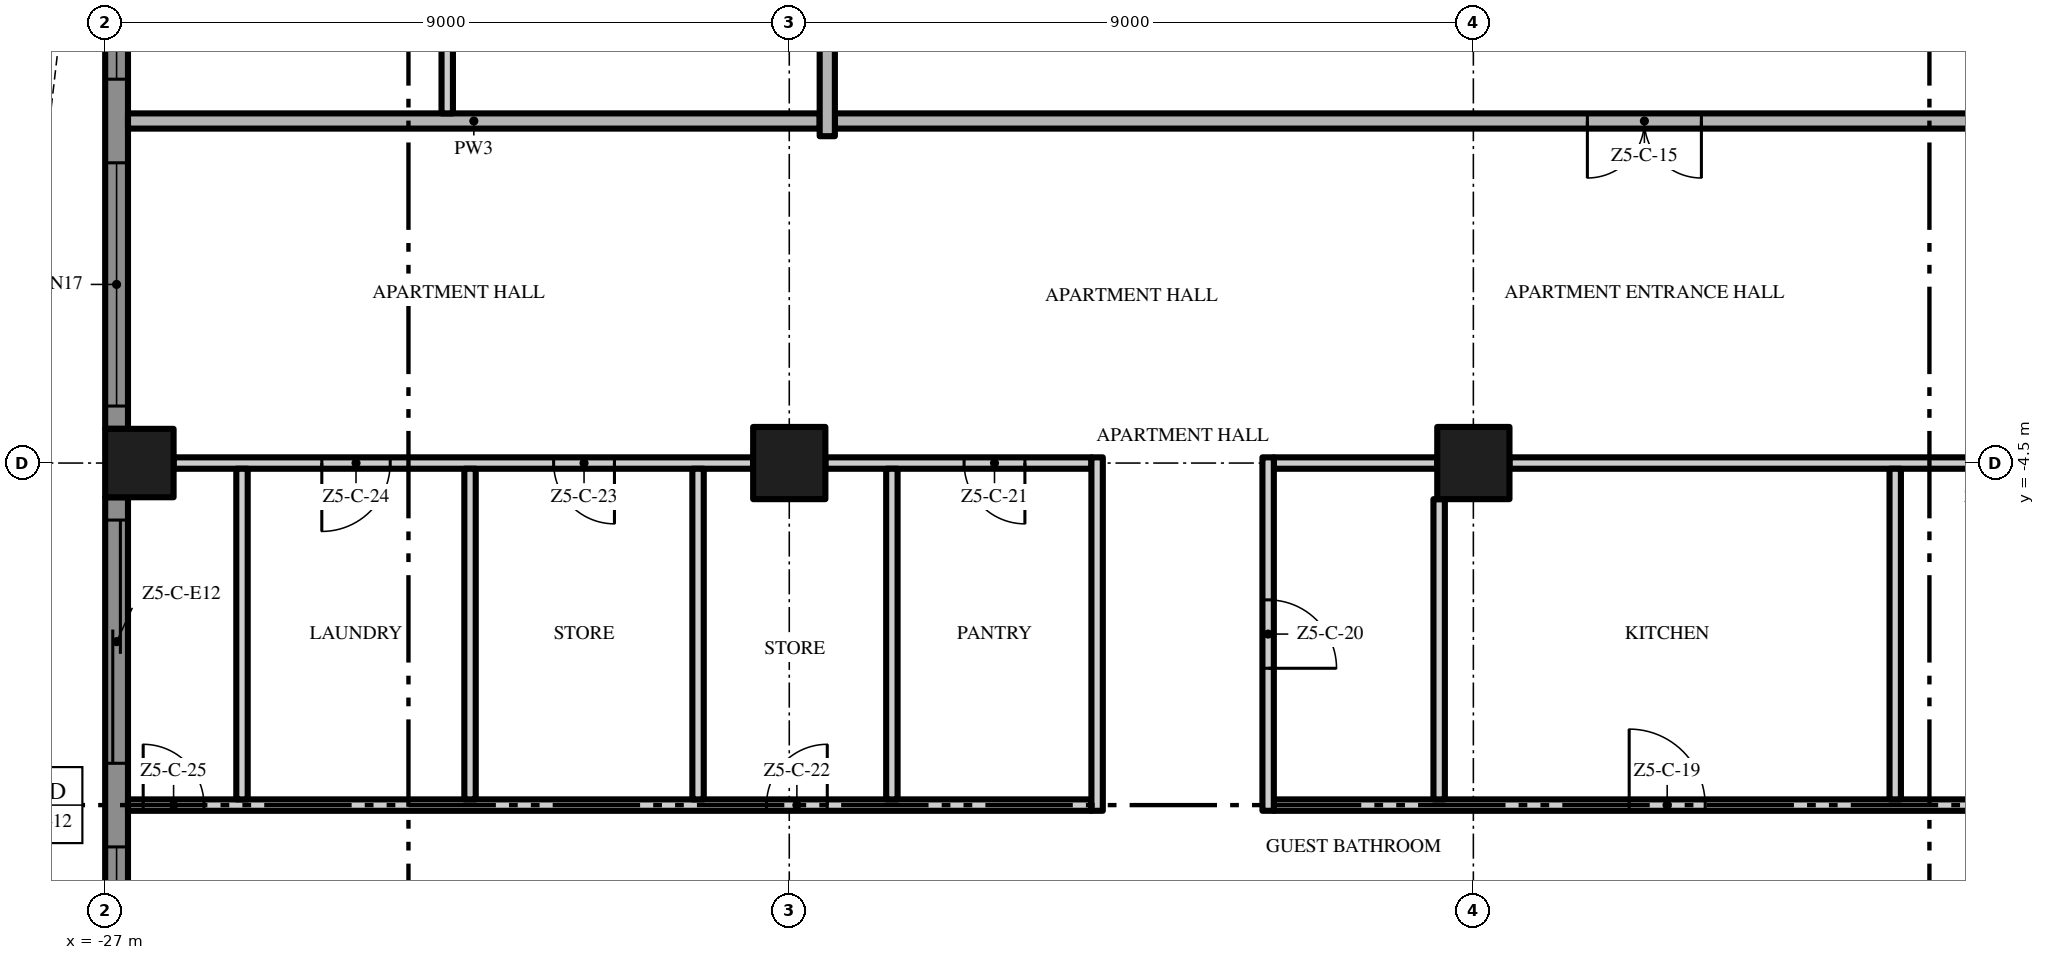
"""IFC4 building model, lengths in metres.
Left out: names, types, materials, properties, quantities, classifications, styles, units other than length and angle.
Written with IfcOpenShell. Run it as: python <this file> out.ifc"""

import sys

from ifc_helpers import new_model, si_unit, direction, frame, frame_2d, origin, origin_2d, place, context, subcontext, project, spatial, polyline, rectangle, outline, extrude, element, fill, save


model = new_model("IFC4")
c1 = context("Model", 3, precision=1e-05, world=origin(), true_north=direction((0.0, 1.0)))
c2 = subcontext(c1, "Body", "Model", "MODEL_VIEW")
j1 = project(units=[si_unit("LENGTHUNIT", "METRE"), si_unit("PLANEANGLEUNIT", "RADIAN")], contexts=[c1])
p1 = place(None, origin())
s1 = spatial("IfcSite", under=j1, at=p1, CompositionType="ELEMENT")
p2 = place(p1, origin())
s2 = spatial("IfcBuilding", under=s1, at=p2, CompositionType="ELEMENT")
p3 = place(p2, frame((0.0, 0.0, 261.6)))
s3 = spatial("IfcBuildingStorey", under=s2, at=p3, CompositionType="ELEMENT", Elevation=261.6)
p4 = place(p3, frame((-18.0, -4.5, 0.0), z_axis=(0.0, 0.0, 1.0), x_axis=(1.0, 0.0, 0.0)))
e1 = element("IfcColumn", 1, at=p4, inside=s3, PredefinedType="COLUMN", context=c2, shape_type="SweptSolid", body=[
    extrude(rectangle(XDim=0.95, YDim=0.95, at=origin_2d()), origin(), (0.0, 0.0, 1.0), 3.5),
])
p5 = place(p3, frame((-26.55, -4.5, 0.0), z_axis=(0.0, 0.0, 1.0), x_axis=(1.0, 0.0, 0.0)))
e2 = element("IfcColumn", 2, at=p5, inside=s3, PredefinedType="COLUMN", context=c2, shape_type="SweptSolid", body=[
    extrude(rectangle(XDim=0.9, YDim=0.9, at=origin_2d()), origin(), (0.0, 0.0, 1.0), 3.5),
])
p6 = place(p3, frame((-9.0, -4.5, 0.0), z_axis=(0.0, 0.0, 1.0), x_axis=(1.0, 0.0, 0.0)))
e3 = element("IfcColumn", 3, at=p6, inside=s3, PredefinedType="COLUMN", context=c2, shape_type="SweptSolid", body=[
    extrude(rectangle(XDim=0.95, YDim=0.95, at=origin_2d()), origin(), (0.0, 0.0, 1.0), 3.5),
])
p7 = place(p3, frame((-26.85, -4.05, 0.0), z_axis=(0.0, 0.0, 1.0), x_axis=(0.0, 1.0, 0.0)))
e4 = element("IfcWall", 4, at=p7, inside=s3, PredefinedType="SOLIDWALL", context=c2, shape_type="SweptSolid", body=[
    extrude(rectangle(XDim=8.1, YDim=0.3, at=frame_2d((4.05, 0.0))), origin(), (0.0, 0.0, 1.0), 3.5),
])
p8 = place(p7, frame((4.6, 0.0, 0.45)))
e5 = element("IfcOpeningElement", 5, at=p8, cuts=e4, PredefinedType="OPENING", context=c2, shape_type="SweptSolid", body=[
    extrude(rectangle(XDim=3.2, YDim=2.65, at=frame_2d((1.6, 1.325))), frame((0.0, 0.16, 0.0), z_axis=(0.0, -1.0, 0.0), x_axis=(1.0, 0.0, 0.0)), (0.0, 0.0, 1.0), 0.32),
])
p9 = place(p7, frame((0.3, 0.0, 0.45)))
e6 = element("IfcOpeningElement", 6, at=p9, cuts=e4, PredefinedType="OPENING", context=c2, shape_type="SweptSolid", body=[
    extrude(rectangle(XDim=3.2, YDim=2.65, at=frame_2d((1.6, 1.325))), frame((0.0, 0.16, 0.0), z_axis=(0.0, -1.0, 0.0), x_axis=(1.0, 0.0, 0.0)), (0.0, 0.0, 1.0), 0.32),
])
p10 = place(p3, frame((-26.85, -13.05, 0.0), z_axis=(0.0, 0.0, 1.0), x_axis=(0.0, 1.0, 0.0)))
e7 = element("IfcWall", 7, at=p10, inside=s3, PredefinedType="SOLIDWALL", context=c2, shape_type="SweptSolid", body=[
    extrude(rectangle(XDim=8.1, YDim=0.3, at=frame_2d((4.05, 0.0))), origin(), (0.0, 0.0, 1.0), 3.5),
])
p11 = place(p10, frame((4.6, 0.0, 0.0)))
e8 = element("IfcOpeningElement", 8, at=p11, cuts=e7, PredefinedType="OPENING", context=c2, shape_type="SweptSolid", body=[
    extrude(rectangle(XDim=3.2, YDim=2.4, at=frame_2d((1.6, 1.2))), frame((0.0, 0.16, 0.0), z_axis=(0.0, -1.0, 0.0), x_axis=(1.0, 0.0, 0.0)), (0.0, 0.0, 1.0), 0.32),
])
p12 = place(p10, frame((0.3, 0.0, 0.45)))
e9 = element("IfcOpeningElement", 9, at=p12, cuts=e7, PredefinedType="OPENING", context=c2, shape_type="SweptSolid", body=[
    extrude(rectangle(XDim=3.2, YDim=2.65, at=frame_2d((1.6, 1.325))), frame((0.0, 0.16, 0.0), z_axis=(0.0, -1.0, 0.0), x_axis=(1.0, 0.0, 0.0)), (0.0, 0.0, 1.0), 0.32),
])
p13 = place(p3, origin())
e10 = element("IfcWall", 10, at=p13, inside=s3, PredefinedType="USERDEFINED", context=c2, shape_type="SweptSolid", body=[
    extrude(outline(polyline([(-27.951, 18.0), (-27.615, 16.5), (-27.6, 16.125), (-27.731, 15.0), (-28.255, 13.5), (-28.988, 12.0), (-29.649, 10.5), (-29.985, 9.0), (-30.0, 8.625), (-29.869, 7.5), (-29.345, 6.0), (-28.612, 4.5), (-27.951, 3.0), (-27.615, 1.5), (-27.6, 1.125), (-27.731, 0.0), (-28.255, -1.5), (-28.988, -3.0), (-29.649, -4.5), (-29.985, -6.0), (-30.0, -6.375), (-29.869, -7.5), (-29.345, -9.0), (-28.612, -10.5), (-27.951, -12.0), (-27.615, -13.5), (-27.6, -13.875), (-27.731, -15.0), (-28.255, -16.5), (-28.988, -18.0), (-28.763, -18.11), (-28.024, -16.596), (-27.486, -15.056), (-27.349, -13.885), (-27.366, -13.467), (-27.713, -11.921), (-28.385, -10.395), (-29.114, -8.904), (-29.624, -7.444), (-29.749, -6.365), (-29.736, -6.033), (-29.41, -4.579), (-28.761, -3.105), (-28.024, -1.596), (-27.486, -0.056), (-27.349, 1.115), (-27.366, 1.533), (-27.713, 3.079), (-28.385, 4.605), (-29.114, 6.096), (-29.624, 7.556), (-29.749, 8.635), (-29.736, 8.967), (-29.41, 10.421), (-28.761, 11.895), (-28.024, 13.404), (-27.486, 14.944), (-27.349, 16.115), (-27.366, 16.533), (-27.708, 18.055), (-27.951, 18.0)])), origin(), (0.0, 0.0, 1.0), 0.9),
])
p14 = place(p3, frame((-26.7, -9.0, 0.0), z_axis=(0.0, 0.0, 1.0), x_axis=(1.0, 0.0, 0.0)))
e11 = element("IfcWall", 11, at=p14, inside=s3, PredefinedType="PARTITIONING", context=c2, shape_type="SweptSolid", body=[
    extrude(rectangle(XDim=12.675, YDim=0.15, at=frame_2d((6.338, 0.0))), origin(), (0.0, 0.0, 1.0), 3.5),
])
p15 = place(p14, frame((8.4, 0.0, 0.0)))
e12 = element("IfcOpeningElement", 12, at=p15, cuts=e11, PredefinedType="OPENING", context=c2, shape_type="SweptSolid", body=[
    extrude(rectangle(XDim=0.8, YDim=2.0, at=frame_2d((0.4, 1.0))), frame((0.0, 0.085, 0.0), z_axis=(0.0, -1.0, 0.0), x_axis=(1.0, 0.0, 0.0)), (0.0, 0.0, 1.0), 0.17),
])
p16 = place(p14, frame((0.2, 0.0, 0.0)))
e13 = element("IfcOpeningElement", 13, at=p16, cuts=e11, PredefinedType="OPENING", context=c2, shape_type="SweptSolid", body=[
    extrude(rectangle(XDim=0.8, YDim=2.0, at=frame_2d((0.4, 1.0))), frame((0.0, 0.085, 0.0), z_axis=(0.0, -1.0, 0.0), x_axis=(1.0, 0.0, 0.0)), (0.0, 0.0, 1.0), 0.17),
])
p17 = place(p3, frame((-11.625, -9.0, 0.0), z_axis=(0.0, 0.0, 1.0), x_axis=(1.0, 0.0, 0.0)))
e14 = element("IfcWall", 14, at=p17, inside=s3, PredefinedType="PARTITIONING", context=c2, shape_type="SweptSolid", body=[
    extrude(rectangle(XDim=16.025, YDim=0.15, at=frame_2d((8.012, 0.0))), origin(), (0.0, 0.0, 1.0), 3.5),
])
p18 = place(p17, frame((4.675, 0.0, 0.0)))
e15 = element("IfcOpeningElement", 15, at=p18, cuts=e14, PredefinedType="OPENING", context=c2, shape_type="SweptSolid", body=[
    extrude(rectangle(XDim=1.0, YDim=2.4, at=frame_2d((0.5, 1.2))), frame((0.0, 0.085, 0.0), z_axis=(0.0, -1.0, 0.0), x_axis=(1.0, 0.0, 0.0)), (0.0, 0.0, 1.0), 0.17),
])
p19 = place(p3, frame((-18.475, -4.5, 0.0), z_axis=(0.0, 0.0, 1.0), x_axis=(-1.0, 0.0, 0.0)))
e16 = element("IfcWall", 16, at=p19, inside=s3, PredefinedType="PARTITIONING", context=c2, shape_type="SweptSolid", body=[
    extrude(rectangle(XDim=7.625, YDim=0.15, at=frame_2d((3.812, 0.0))), origin(), (0.0, 0.0, 1.0), 3.5),
])
p20 = place(p19, frame((1.825, 0.0, 0.0)))
e17 = element("IfcOpeningElement", 17, at=p20, cuts=e16, PredefinedType="OPENING", context=c2, shape_type="SweptSolid", body=[
    extrude(rectangle(XDim=0.8, YDim=2.0, at=frame_2d((0.4, 1.0))), frame((0.0, 0.085, 0.0), z_axis=(0.0, -1.0, 0.0), x_axis=(1.0, 0.0, 0.0)), (0.0, 0.0, 1.0), 0.17),
])
p21 = place(p19, frame((4.775, 0.0, 0.0)))
e18 = element("IfcOpeningElement", 18, at=p21, cuts=e16, PredefinedType="OPENING", context=c2, shape_type="SweptSolid", body=[
    extrude(rectangle(XDim=0.9, YDim=2.1, at=frame_2d((0.45, 1.05))), frame((0.0, 0.085, 0.0), z_axis=(0.0, -1.0, 0.0), x_axis=(1.0, 0.0, 0.0)), (0.0, 0.0, 1.0), 0.17),
])
p22 = place(p3, frame((-14.025, -4.5, 0.0), z_axis=(0.0, 0.0, 1.0), x_axis=(-1.0, 0.0, 0.0)))
e19 = element("IfcWall", 19, at=p22, inside=s3, PredefinedType="PARTITIONING", context=c2, shape_type="SweptSolid", body=[
    extrude(rectangle(XDim=3.5, YDim=0.15, at=frame_2d((1.75, 0.0))), origin(), (0.0, 0.0, 1.0), 3.5),
])
p23 = place(p22, frame((0.875, 0.0, 0.0)))
e20 = element("IfcOpeningElement", 20, at=p23, cuts=e19, PredefinedType="OPENING", context=c2, shape_type="SweptSolid", body=[
    extrude(rectangle(XDim=0.8, YDim=2.0, at=frame_2d((0.4, 1.0))), frame((0.0, 0.085, 0.0), z_axis=(0.0, -1.0, 0.0), x_axis=(1.0, 0.0, 0.0)), (0.0, 0.0, 1.0), 0.17),
])
p24 = place(p3, frame((-11.625, -4.5, 0.0), z_axis=(0.0, 0.0, 1.0), x_axis=(1.0, 0.0, 0.0)))
e21 = element("IfcWall", 21, at=p24, inside=s3, PredefinedType="PARTITIONING", context=c2, shape_type="SweptSolid", body=[
    extrude(rectangle(XDim=2.15, YDim=0.15, at=frame_2d((1.075, 0.0))), origin(), (0.0, 0.0, 1.0), 3.5),
])
p25 = place(p3, frame((-0.475, -4.5, 0.0), z_axis=(0.0, 0.0, 1.0), x_axis=(-1.0, 0.0, 0.0)))
e22 = element("IfcWall", 22, at=p25, inside=s3, PredefinedType="PARTITIONING", context=c2, shape_type="SweptSolid", body=[
    extrude(rectangle(XDim=8.05, YDim=0.15, at=frame_2d((4.025, 0.0))), origin(), (0.0, 0.0, 1.0), 3.5),
])
p26 = place(p25, frame((1.225, 0.0, 0.0)))
e23 = element("IfcOpeningElement", 23, at=p26, cuts=e22, PredefinedType="OPENING", context=c2, shape_type="SweptSolid", body=[
    extrude(rectangle(XDim=0.8, YDim=2.0, at=frame_2d((0.4, 1.0))), frame((0.0, 0.085, 0.0), z_axis=(0.0, -1.0, 0.0), x_axis=(1.0, 0.0, 0.0)), (0.0, 0.0, 1.0), 0.17),
])
p27 = place(p3, frame((17.4, 0.0, 0.0), z_axis=(0.0, 0.0, 1.0), x_axis=(-1.0, 0.0, 0.0)))
e24 = element("IfcWall", 24, at=p27, inside=s3, PredefinedType="PARTITIONING", context=c2, shape_type="SweptSolid", body=[
    extrude(rectangle(XDim=34.8, YDim=0.2, at=frame_2d((17.4, 0.0))), origin(), (0.0, 0.0, 1.0), 3.5),
])
p28 = place(p27, frame((23.4, 0.0, 0.0)))
e25 = element("IfcOpeningElement", 25, at=p28, cuts=e24, PredefinedType="OPENING", context=c2, shape_type="SweptSolid", body=[
    extrude(rectangle(XDim=1.5, YDim=2.4, at=frame_2d((0.75, 1.2))), frame((0.0, 0.11, 0.0), z_axis=(0.0, -1.0, 0.0), x_axis=(1.0, 0.0, 0.0)), (0.0, 0.0, 1.0), 0.22),
])
p29 = place(p27, frame((5.4, 0.0, 0.0)))
e26 = element("IfcOpeningElement", 26, at=p29, cuts=e24, PredefinedType="OPENING", context=c2, shape_type="SweptSolid", body=[
    extrude(rectangle(XDim=1.5, YDim=2.4, at=frame_2d((0.75, 1.2))), frame((0.0, 0.11, 0.0), z_axis=(0.0, -1.0, 0.0), x_axis=(1.0, 0.0, 0.0)), (0.0, 0.0, 1.0), 0.22),
])
p30 = place(p3, frame((-26.7, 0.0, 0.0), z_axis=(0.0, 0.0, 1.0), x_axis=(1.0, 0.0, 0.0)))
e27 = element("IfcWall", 27, at=p30, inside=s3, PredefinedType="PARTITIONING", context=c2, shape_type="SweptSolid", body=[
    extrude(rectangle(XDim=9.1, YDim=0.2, at=frame_2d((4.55, 0.0))), origin(), (0.0, 0.0, 1.0), 3.5),
])
p31 = place(p3, frame((-25.2, -8.925, 0.0), z_axis=(0.0, 0.0, 1.0), x_axis=(0.0, 1.0, 0.0)))
e28 = element("IfcWall", 28, at=p31, inside=s3, PredefinedType="PARTITIONING", context=c2, shape_type="SweptSolid", body=[
    extrude(rectangle(XDim=4.35, YDim=0.15, at=frame_2d((2.175, 0.0))), origin(), (0.0, 0.0, 1.0), 3.5),
])
p32 = place(p3, frame((-22.5, 0.1, 0.0), z_axis=(0.0, 0.0, 1.0), x_axis=(0.0, 1.0, 0.0)))
e29 = element("IfcWall", 29, at=p32, inside=s3, PredefinedType="PARTITIONING", context=c2, shape_type="SweptSolid", body=[
    extrude(rectangle(XDim=17.45, YDim=0.15, at=frame_2d((8.725, 0.0))), origin(), (0.0, 0.0, 1.0), 3.5),
])
p33 = place(p32, frame((1.65, 0.0, 0.0)))
e30 = element("IfcOpeningElement", 30, at=p33, cuts=e29, PredefinedType="OPENING", context=c2, shape_type="SweptSolid", body=[
    extrude(rectangle(XDim=1.0, YDim=2.4, at=frame_2d((0.5, 1.2))), frame((0.0, 0.085, 0.0), z_axis=(0.0, -1.0, 0.0), x_axis=(1.0, 0.0, 0.0)), (0.0, 0.0, 1.0), 0.17),
])
p34 = place(p32, frame((5.0, 0.0, 0.0)))
e31 = element("IfcOpeningElement", 31, at=p34, cuts=e29, PredefinedType="OPENING", context=c2, shape_type="SweptSolid", body=[
    extrude(rectangle(XDim=1.0, YDim=2.4, at=frame_2d((0.5, 1.2))), frame((0.0, 0.085, 0.0), z_axis=(0.0, -1.0, 0.0), x_axis=(1.0, 0.0, 0.0)), (0.0, 0.0, 1.0), 0.17),
])
p35 = place(p32, frame((13.25, 0.0, 0.0)))
e32 = element("IfcOpeningElement", 32, at=p35, cuts=e29, PredefinedType="OPENING", context=c2, shape_type="SweptSolid", body=[
    extrude(rectangle(XDim=1.8, YDim=2.4, at=frame_2d((0.9, 1.2))), frame((0.0, 0.085, 0.0), z_axis=(0.0, -1.0, 0.0), x_axis=(1.0, 0.0, 0.0)), (0.0, 0.0, 1.0), 0.17),
])
for number, where, z_axis, x_axis in (
    (33, (-22.2, -8.925, 0.0), (0.0, 0.0, 1.0), (0.0, 1.0, 0.0)),
    (34, (-19.2, -8.925, 0.0), (0.0, 0.0, 1.0), (0.0, 1.0, 0.0)),
):
    element("IfcWall", number, at=place(p3, frame(where, z_axis=z_axis, x_axis=x_axis)), inside=s3, PredefinedType="PARTITIONING", context=c2, shape_type="SweptSolid", body=[
        extrude(rectangle(XDim=4.35, YDim=0.15, at=frame_2d((2.175, 0.0))), origin(), (0.0, 0.0, 1.0), 3.5),
    ])
p36 = place(p3, frame((-17.5, -0.2, 0.0), z_axis=(0.0, 0.0, 1.0), x_axis=(0.0, 1.0, 0.0)))
e35 = element("IfcWall", 35, at=p36, inside=s3, PredefinedType="PARTITIONING", context=c2, shape_type="SweptSolid", body=[
    extrude(rectangle(XDim=4.225, YDim=0.2, at=frame_2d((2.112, 0.0))), origin(), (0.0, 0.0, 1.0), 3.5),
])
p37 = place(p3, frame((-16.65, -8.925, 0.0), z_axis=(0.0, 0.0, 1.0), x_axis=(0.0, 1.0, 0.0)))
e36 = element("IfcWall", 36, at=p37, inside=s3, PredefinedType="PARTITIONING", context=c2, shape_type="SweptSolid", body=[
    extrude(rectangle(XDim=4.35, YDim=0.15, at=frame_2d((2.175, 0.0))), origin(), (0.0, 0.0, 1.0), 3.5),
])
p38 = place(p3, frame((-13.95, -9.075, 0.0), z_axis=(0.0, 0.0, 1.0), x_axis=(0.0, 1.0, 0.0)))
e37 = element("IfcWall", 37, at=p38, inside=s3, PredefinedType="PARTITIONING", context=c2, shape_type="SweptSolid", body=[
    extrude(rectangle(XDim=4.65, YDim=0.15, at=frame_2d((2.325, 0.0))), origin(), (0.0, 0.0, 1.0), 3.5),
])
p39 = place(p3, frame((-11.7, -4.425, 0.0), z_axis=(0.0, 0.0, 1.0), x_axis=(0.0, -1.0, 0.0)))
e38 = element("IfcWall", 38, at=p39, inside=s3, PredefinedType="PARTITIONING", context=c2, shape_type="SweptSolid", body=[
    extrude(rectangle(XDim=4.65, YDim=0.15, at=frame_2d((2.325, 0.0))), origin(), (0.0, 0.0, 1.0), 3.5),
])
p40 = place(p39, frame((1.875, 0.0, 0.0)))
e39 = element("IfcOpeningElement", 39, at=p40, cuts=e38, PredefinedType="OPENING", context=c2, shape_type="SweptSolid", body=[
    extrude(rectangle(XDim=0.9, YDim=2.1, at=frame_2d((0.45, 1.05))), frame((0.0, 0.085, 0.0), z_axis=(0.0, -1.0, 0.0), x_axis=(1.0, 0.0, 0.0)), (0.0, 0.0, 1.0), 0.17),
])
p41 = place(p3, frame((-9.45, -8.925, 0.0), z_axis=(0.0, 0.0, 1.0), x_axis=(0.0, 1.0, 0.0)))
e40 = element("IfcWall", 40, at=p41, inside=s3, PredefinedType="PARTITIONING", context=c2, shape_type="SweptSolid", body=[
    extrude(rectangle(XDim=3.95, YDim=0.15, at=frame_2d((1.975, 0.0))), origin(), (0.0, 0.0, 1.0), 3.5),
])
p42 = place(p3, frame((-3.45, -8.925, 0.0), z_axis=(0.0, 0.0, 1.0), x_axis=(0.0, 1.0, 0.0)))
e41 = element("IfcWall", 41, at=p42, inside=s3, PredefinedType="PARTITIONING", context=c2, shape_type="SweptSolid", body=[
    extrude(rectangle(XDim=4.35, YDim=0.15, at=frame_2d((2.175, 0.0))), origin(), (0.0, 0.0, 1.0), 3.5),
])
p43 = place(p8, origin())
e42 = element("IfcWindow", 42, at=p43, inside=s3, PartitioningType="SINGLE_PANEL", PredefinedType="WINDOW", context=c2, shape_type="SweptSolid", body=[
    extrude(rectangle(XDim=3.2, YDim=2.65, at=frame_2d((1.6, 1.325))), frame((0.0, 0.03, 0.0), z_axis=(0.0, -1.0, 0.0), x_axis=(1.0, 0.0, 0.0)), (0.0, 0.0, 1.0), 0.06),
])
fill(e5, e42)
p44 = place(p9, origin())
e43 = element("IfcWindow", 43, at=p44, inside=s3, PartitioningType="SINGLE_PANEL", PredefinedType="WINDOW", context=c2, shape_type="SweptSolid", body=[
    extrude(rectangle(XDim=3.2, YDim=2.65, at=frame_2d((1.6, 1.325))), frame((0.0, 0.03, 0.0), z_axis=(0.0, -1.0, 0.0), x_axis=(1.0, 0.0, 0.0)), (0.0, 0.0, 1.0), 0.06),
])
fill(e6, e43)
p45 = place(p11, origin())
e44 = element("IfcDoor", 44, at=p45, inside=s3, OperationType="SINGLE_SWING_LEFT", PredefinedType="DOOR", context=c2, shape_type="SweptSolid", body=[
    extrude(rectangle(XDim=3.2, YDim=2.4, at=frame_2d((1.6, 1.2))), frame((0.0, 0.025, 0.0), z_axis=(0.0, -1.0, 0.0), x_axis=(1.0, 0.0, 0.0)), (0.0, 0.0, 1.0), 0.05),
])
fill(e8, e44)
p46 = place(p12, origin())
e45 = element("IfcWindow", 45, at=p46, inside=s3, PartitioningType="SINGLE_PANEL", PredefinedType="WINDOW", context=c2, shape_type="SweptSolid", body=[
    extrude(rectangle(XDim=3.2, YDim=2.65, at=frame_2d((1.6, 1.325))), frame((0.0, 0.03, 0.0), z_axis=(0.0, -1.0, 0.0), x_axis=(1.0, 0.0, 0.0)), (0.0, 0.0, 1.0), 0.06),
])
fill(e9, e45)
p47 = place(p28, origin())
e46 = element("IfcDoor", 46, at=p47, inside=s3, OperationType="DOUBLE_DOOR_SINGLE_SWING", PredefinedType="DOOR", context=c2, shape_type="SweptSolid", body=[
    extrude(rectangle(XDim=1.5, YDim=2.4, at=frame_2d((0.75, 1.2))), frame((0.0, 0.025, 0.0), z_axis=(0.0, -1.0, 0.0), x_axis=(1.0, 0.0, 0.0)), (0.0, 0.0, 1.0), 0.05),
])
fill(e25, e46)
p48 = place(p18, origin())
e47 = element("IfcDoor", 47, at=p48, inside=s3, OperationType="SINGLE_SWING_LEFT", PredefinedType="DOOR", context=c2, shape_type="SweptSolid", body=[
    extrude(rectangle(XDim=1.0, YDim=2.4, at=frame_2d((0.5, 1.2))), frame((0.0, 0.025, 0.0), z_axis=(0.0, -1.0, 0.0), x_axis=(1.0, 0.0, 0.0)), (0.0, 0.0, 1.0), 0.05),
])
fill(e15, e47)
p49 = place(p40, origin())
e48 = element("IfcDoor", 48, at=p49, inside=s3, OperationType="SINGLE_SWING_RIGHT", PredefinedType="DOOR", context=c2, shape_type="SweptSolid", body=[
    extrude(rectangle(XDim=0.9, YDim=2.1, at=frame_2d((0.45, 1.05))), frame((0.0, 0.025, 0.0), z_axis=(0.0, -1.0, 0.0), x_axis=(1.0, 0.0, 0.0)), (0.0, 0.0, 1.0), 0.05),
])
fill(e39, e48)
p50 = place(p23, origin())
e49 = element("IfcDoor", 49, at=p50, inside=s3, OperationType="SINGLE_SWING_LEFT", PredefinedType="DOOR", context=c2, shape_type="SweptSolid", body=[
    extrude(rectangle(XDim=0.8, YDim=2.0, at=frame_2d((0.4, 1.0))), frame((0.0, 0.025, 0.0), z_axis=(0.0, -1.0, 0.0), x_axis=(1.0, 0.0, 0.0)), (0.0, 0.0, 1.0), 0.05),
])
fill(e20, e49)
p51 = place(p15, origin())
e50 = element("IfcDoor", 50, at=p51, inside=s3, OperationType="SINGLE_SWING_RIGHT", PredefinedType="DOOR", context=c2, shape_type="SweptSolid", body=[
    extrude(rectangle(XDim=0.8, YDim=2.0, at=frame_2d((0.4, 1.0))), frame((0.0, 0.025, 0.0), z_axis=(0.0, -1.0, 0.0), x_axis=(1.0, 0.0, 0.0)), (0.0, 0.0, 1.0), 0.05),
])
fill(e12, e50)
p52 = place(p20, origin())
e51 = element("IfcDoor", 51, at=p52, inside=s3, OperationType="SINGLE_SWING_LEFT", PredefinedType="DOOR", context=c2, shape_type="SweptSolid", body=[
    extrude(rectangle(XDim=0.8, YDim=2.0, at=frame_2d((0.4, 1.0))), frame((0.0, 0.025, 0.0), z_axis=(0.0, -1.0, 0.0), x_axis=(1.0, 0.0, 0.0)), (0.0, 0.0, 1.0), 0.05),
])
fill(e17, e51)
p53 = place(p21, origin())
e52 = element("IfcDoor", 52, at=p53, inside=s3, OperationType="SINGLE_SWING_RIGHT", PredefinedType="DOOR", context=c2, shape_type="SweptSolid", body=[
    extrude(rectangle(XDim=0.9, YDim=2.1, at=frame_2d((0.45, 1.05))), frame((0.0, 0.025, 0.0), z_axis=(0.0, -1.0, 0.0), x_axis=(1.0, 0.0, 0.0)), (0.0, 0.0, 1.0), 0.05),
])
fill(e18, e52)
p54 = place(p16, origin())
e53 = element("IfcDoor", 53, at=p54, inside=s3, OperationType="SINGLE_SWING_LEFT", PredefinedType="DOOR", context=c2, shape_type="SweptSolid", body=[
    extrude(rectangle(XDim=0.8, YDim=2.0, at=frame_2d((0.4, 1.0))), frame((0.0, 0.025, 0.0), z_axis=(0.0, -1.0, 0.0), x_axis=(1.0, 0.0, 0.0)), (0.0, 0.0, 1.0), 0.05),
])
fill(e13, e53)
save(model, sys.argv[1])
